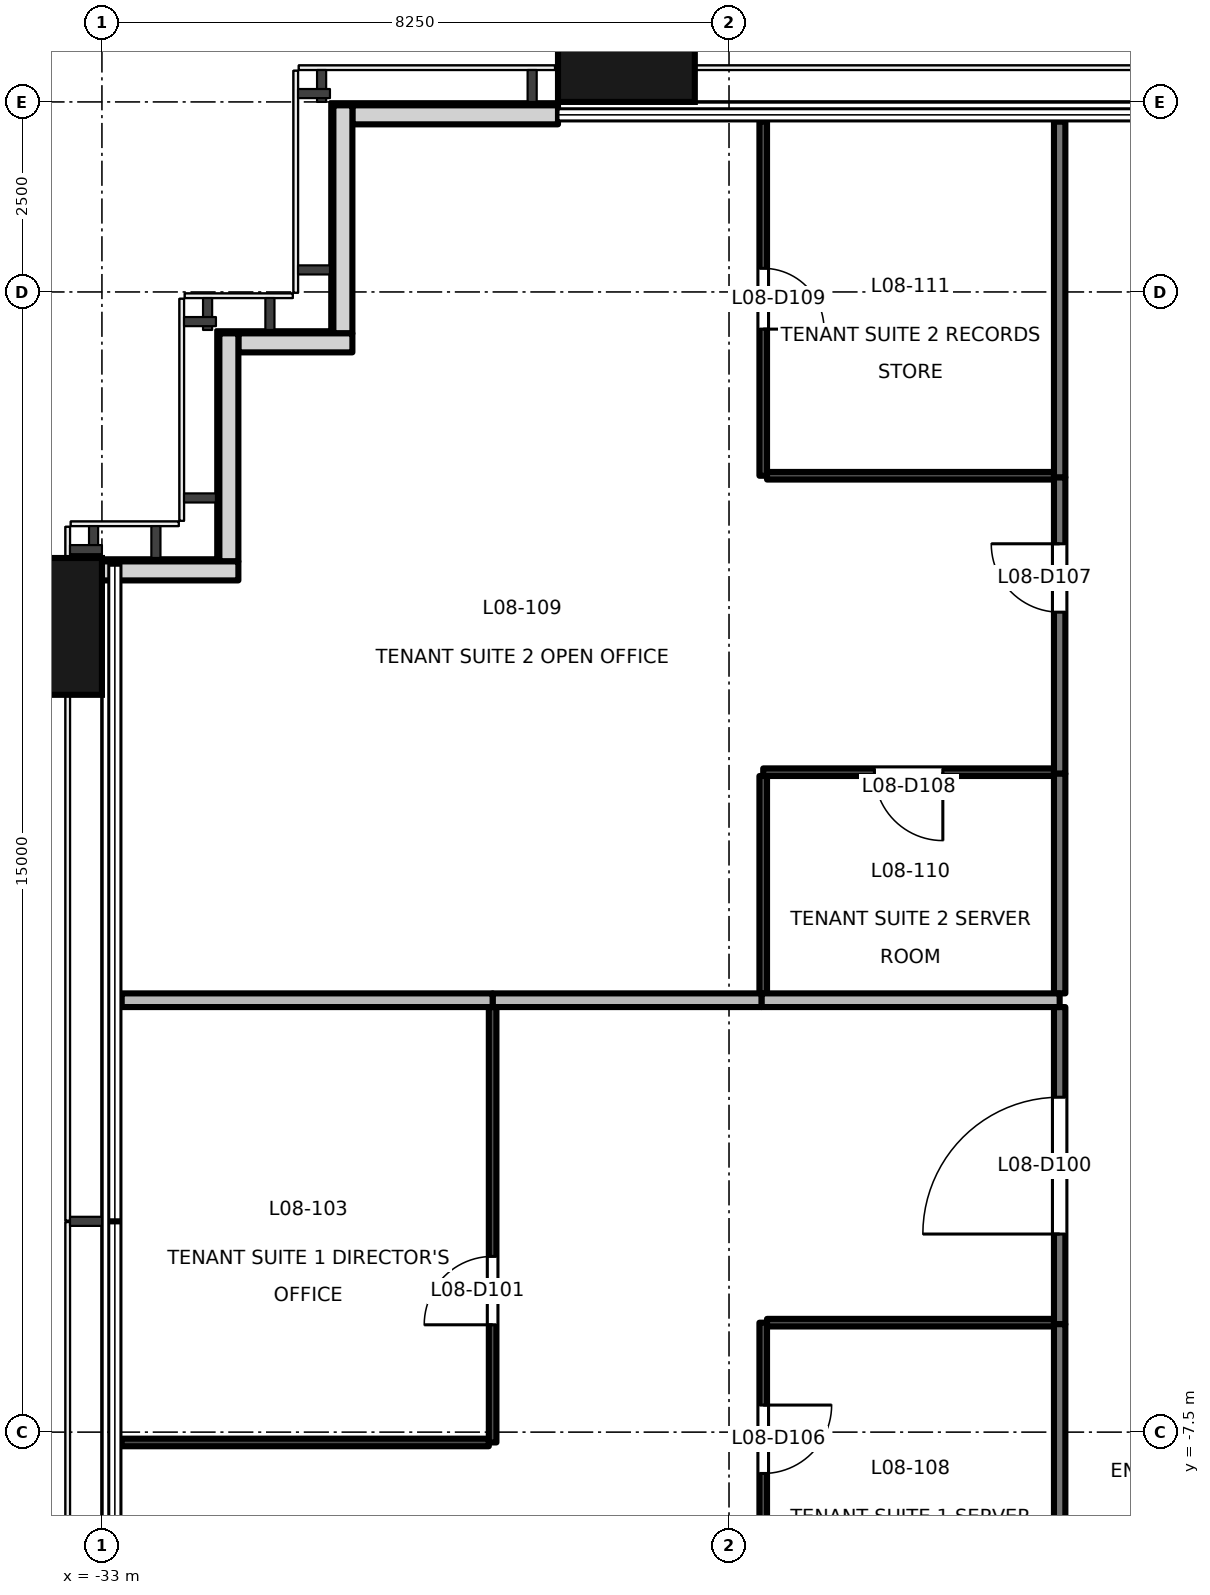
"""IFC4 building model, lengths in metres.
Left out: names, types, materials, properties, quantities, classifications, styles, units other than length and angle.
Written with IfcOpenShell. Run it as: python <this file> out.ifc"""

import sys

from ifc_helpers import new_model, si_unit, direction, frame, frame_2d, origin, origin_2d, place, context, subcontext, project, spatial, rectangle, extrude, element, fill, save


model = new_model("IFC4")
c1 = context("Model", 3, precision=1e-05, world=origin(), true_north=direction((0.0, 1.0)))
c2 = subcontext(c1, "Body", "Model", "MODEL_VIEW")
j1 = project(units=[si_unit("LENGTHUNIT", "METRE"), si_unit("PLANEANGLEUNIT", "RADIAN")], contexts=[c1])
p1 = place(None, origin())
s1 = spatial("IfcSite", under=j1, at=p1, CompositionType="ELEMENT")
p2 = place(p1, origin())
s2 = spatial("IfcBuilding", under=s1, at=p2, CompositionType="ELEMENT")
p3 = place(p2, frame((0.0, 0.0, 40.6)))
s3 = spatial("IfcBuildingStorey", under=s2, at=p3, CompositionType="ELEMENT", Elevation=40.6)
for number, where, z_axis, x_axis in (
    (1, (-33.9, 3.1, -0.2), (0.0, 0.0, 1.0), (0.0, 1.0, 0.0)),
    (2, (-26.1, 10.9, -0.2), (0.0, 0.0, 1.0), (1.0, 0.0, 0.0)),
):
    element("IfcColumn", number, at=place(p3, frame(where, z_axis=z_axis, x_axis=x_axis)), inside=s3, PredefinedType="COLUMN", context=c2, shape_type="SweptSolid", body=[
        extrude(rectangle(XDim=1.8, YDim=1.8, at=origin_2d()), origin(), (0.0, 0.0, 1.0), 4.1),
    ])
p4 = place(p3, frame((-27.0, 9.83, 0.0), z_axis=(0.0, 0.0, 1.0), x_axis=(-1.0, 0.0, 0.0)))
e3 = element("IfcWall", 3, at=p4, inside=s3, PredefinedType="SOLIDWALL", context=c2, shape_type="SweptSolid", body=[
    extrude(rectangle(XDim=2.705, YDim=0.25, at=frame_2d((1.353, 0.0))), origin(), (0.0, 0.0, 1.0), 3.9),
])
p5 = place(p3, frame((-29.83, 9.955, 0.0), z_axis=(0.0, 0.0, 1.0), x_axis=(0.0, -1.0, 0.0)))
e4 = element("IfcWall", 4, at=p5, inside=s3, PredefinedType="SOLIDWALL", context=c2, shape_type="SweptSolid", body=[
    extrude(rectangle(XDim=3.0, YDim=0.25, at=frame_2d((1.5, 0.0))), origin(), (0.0, 0.0, 1.0), 3.9),
])
p6 = place(p3, frame((-29.705, 6.83, 0.0), z_axis=(0.0, 0.0, 1.0), x_axis=(-1.0, 0.0, 0.0)))
e5 = element("IfcWall", 5, at=p6, inside=s3, PredefinedType="SOLIDWALL", context=c2, shape_type="SweptSolid", body=[
    extrude(rectangle(XDim=1.5, YDim=0.25, at=frame_2d((0.75, 0.0))), origin(), (0.0, 0.0, 1.0), 3.9),
])
p7 = place(p3, frame((-31.33, 6.955, 0.0), z_axis=(0.0, 0.0, 1.0), x_axis=(0.0, -1.0, 0.0)))
e6 = element("IfcWall", 6, at=p7, inside=s3, PredefinedType="SOLIDWALL", context=c2, shape_type="SweptSolid", body=[
    extrude(rectangle(XDim=3.0, YDim=0.25, at=frame_2d((1.5, 0.0))), origin(), (0.0, 0.0, 1.0), 3.9),
])
p8 = place(p3, frame((-31.205, 3.83, 0.0), z_axis=(0.0, 0.0, 1.0), x_axis=(-1.0, 0.0, 0.0)))
e7 = element("IfcWall", 7, at=p8, inside=s3, PredefinedType="SOLIDWALL", context=c2, shape_type="SweptSolid", body=[
    extrude(rectangle(XDim=1.8, YDim=0.25, at=frame_2d((0.9, 0.0))), origin(), (0.0, 0.0, 1.0), 3.9),
])
p9 = place(p3, frame((-20.4, -6.08, 0.0), z_axis=(0.0, 0.0, 1.0), x_axis=(0.0, 1.0, 0.0)))
e8 = element("IfcWall", 8, at=p9, inside=s3, PredefinedType="PARTITIONING", context=c2, shape_type="SweptSolid", body=[
    extrude(rectangle(XDim=4.172, YDim=0.15, at=frame_2d((2.086, 0.0))), origin(), (0.0, 0.0, 1.0), 3.3),
])
p10 = place(p9, frame((1.186, 0.0, 0.0)))
e9 = element("IfcOpeningElement", 9, at=p10, cuts=e8, PredefinedType="OPENING", context=c2, shape_type="SweptSolid", body=[
    extrude(rectangle(XDim=1.8, YDim=2.1, at=frame_2d((0.9, 1.05))), frame((0.0, 0.085, 0.0), z_axis=(0.0, -1.0, 0.0), x_axis=(1.0, 0.0, 0.0)), (0.0, 0.0, 1.0), 0.171),
])
p11 = place(p3, frame((-20.4, -10.28, 0.0), z_axis=(0.0, 0.0, 1.0), x_axis=(0.0, 1.0, 0.0)))
e10 = element("IfcWall", 10, at=p11, inside=s3, PredefinedType="PARTITIONING", context=c2, shape_type="SweptSolid", body=[
    extrude(rectangle(XDim=4.2, YDim=0.15, at=frame_2d((2.1, 0.0))), origin(), (0.0, 0.0, 1.0), 3.3),
])
p12 = place(p3, frame((-20.4, 1.162, 0.0), z_axis=(0.0, 0.0, 1.0), x_axis=(0.0, 1.0, 0.0)))
e11 = element("IfcWall", 11, at=p12, inside=s3, PredefinedType="PARTITIONING", context=c2, shape_type="SweptSolid", body=[
    extrude(rectangle(XDim=3.9, YDim=0.15, at=frame_2d((1.95, 0.0))), origin(), (0.0, 0.0, 1.0), 3.9),
])
p13 = place(p12, frame((2.125, 0.0, 0.0)))
e12 = element("IfcOpeningElement", 12, at=p13, cuts=e11, PredefinedType="OPENING", context=c2, shape_type="SweptSolid", body=[
    extrude(rectangle(XDim=0.9, YDim=2.1, at=frame_2d((0.45, 1.05))), frame((0.0, 0.085, 0.0), z_axis=(0.0, -1.0, 0.0), x_axis=(1.0, 0.0, 0.0)), (0.0, 0.0, 1.0), 0.171),
])
p14 = place(p3, frame((-20.4, -1.728, 0.0), z_axis=(0.0, 0.0, 1.0), x_axis=(0.0, 1.0, 0.0)))
e13 = element("IfcWall", 13, at=p14, inside=s3, PredefinedType="PARTITIONING", context=c2, shape_type="SweptSolid", body=[
    extrude(rectangle(XDim=2.89, YDim=0.15, at=frame_2d((1.445, 0.0))), origin(), (0.0, 0.0, 1.0), 3.3),
])
p15 = place(p3, frame((-20.4, 5.062, 0.0), z_axis=(0.0, 0.0, 1.0), x_axis=(0.0, 1.0, 0.0)))
e14 = element("IfcWall", 14, at=p15, inside=s3, PredefinedType="PARTITIONING", context=c2, shape_type="SweptSolid", body=[
    extrude(rectangle(XDim=4.678, YDim=0.15, at=frame_2d((2.339, 0.0))), origin(), (0.0, 0.0, 1.0), 3.9),
])
p16 = place(p3, frame((-32.74, -7.636, 0.0), z_axis=(0.0, 0.0, 1.0), x_axis=(1.0, 0.0, 0.0)))
e15 = element("IfcWall", 15, at=p16, inside=s3, PredefinedType="PARTITIONING", context=c2, shape_type="SweptSolid", body=[
    extrude(rectangle(XDim=4.83, YDim=0.1, at=frame_2d((2.415, 0.0))), origin(), (0.0, 0.0, 1.0), 3.9),
])
p17 = place(p3, frame((-27.86, -7.636, 0.0), z_axis=(0.0, 0.0, 1.0), x_axis=(0.0, 1.0, 0.0)))
e16 = element("IfcWall", 16, at=p17, inside=s3, PredefinedType="PARTITIONING", context=c2, shape_type="SweptSolid", body=[
    extrude(rectangle(XDim=5.728, YDim=0.1, at=frame_2d((2.864, 0.0))), origin(), (0.0, 0.0, 1.0), 3.3),
])
p18 = place(p17, frame((1.548, 0.0, 0.0)))
e17 = element("IfcOpeningElement", 17, at=p18, cuts=e16, PredefinedType="OPENING", context=c2, shape_type="SweptSolid", body=[
    extrude(rectangle(XDim=0.9, YDim=2.1, at=frame_2d((0.45, 1.05))), frame((0.0, 0.061, 0.0), z_axis=(0.0, -1.0, 0.0), x_axis=(1.0, 0.0, 0.0)), (0.0, 0.0, 1.0), 0.121),
])
p19 = place(p3, frame((-24.3, -6.06, 0.0), z_axis=(0.0, 0.0, 1.0), x_axis=(0.0, -1.0, 0.0)))
e18 = element("IfcWall", 18, at=p19, inside=s3, PredefinedType="PARTITIONING", context=c2, shape_type="SweptSolid", body=[
    extrude(rectangle(XDim=4.18, YDim=0.1, at=frame_2d((2.09, 0.0))), origin(), (0.0, 0.0, 1.0), 3.3),
])
p20 = place(p19, frame((1.084, 0.0, 0.0)))
e19 = element("IfcOpeningElement", 19, at=p20, cuts=e18, PredefinedType="OPENING", context=c2, shape_type="SweptSolid", body=[
    extrude(rectangle(XDim=0.9, YDim=2.1, at=frame_2d((0.45, 1.05))), frame((0.0, 0.061, 0.0), z_axis=(0.0, -1.0, 0.0), x_axis=(1.0, 0.0, 0.0)), (0.0, 0.0, 1.0), 0.121),
])
p21 = place(p3, frame((-20.475, -6.06, 0.0), z_axis=(0.0, 0.0, 1.0), x_axis=(-1.0, 0.0, 0.0)))
e20 = element("IfcWall", 20, at=p21, inside=s3, PredefinedType="PARTITIONING", context=c2, shape_type="SweptSolid", body=[
    extrude(rectangle(XDim=3.775, YDim=0.1, at=frame_2d((1.887, 0.0))), origin(), (0.0, 0.0, 1.0), 3.9),
])
p22 = place(p3, frame((-27.86, -1.818, 0.0), z_axis=(0.0, 0.0, 1.0), x_axis=(1.0, 0.0, 0.0)))
e21 = element("IfcWall", 21, at=p22, inside=s3, PredefinedType="PARTITIONING", context=c2, shape_type="SweptSolid", body=[
    extrude(rectangle(XDim=3.54, YDim=0.18, at=frame_2d((1.77, 0.0))), origin(), (0.0, 0.0, 1.0), 3.9),
])
p23 = place(p3, frame((-24.32, -1.818, 0.0), z_axis=(0.0, 0.0, 1.0), x_axis=(1.0, 0.0, 0.0)))
e22 = element("IfcWall", 22, at=p23, inside=s3, PredefinedType="PARTITIONING", context=c2, shape_type="SweptSolid", body=[
    extrude(rectangle(XDim=3.92, YDim=0.18, at=frame_2d((1.96, 0.0))), origin(), (0.0, 0.0, 1.0), 3.9),
])
p24 = place(p3, frame((-32.74, -1.818, 0.0), z_axis=(0.0, 0.0, 1.0), x_axis=(1.0, 0.0, 0.0)))
e23 = element("IfcWall", 23, at=p24, inside=s3, PredefinedType="PARTITIONING", context=c2, shape_type="SweptSolid", body=[
    extrude(rectangle(XDim=4.88, YDim=0.18, at=frame_2d((2.44, 0.0))), origin(), (0.0, 0.0, 1.0), 3.9),
])
p25 = place(p3, frame((-24.3, 1.132, 0.0), z_axis=(0.0, 0.0, 1.0), x_axis=(0.0, -1.0, 0.0)))
e24 = element("IfcWall", 24, at=p25, inside=s3, PredefinedType="PARTITIONING", context=c2, shape_type="SweptSolid", body=[
    extrude(rectangle(XDim=2.86, YDim=0.1, at=frame_2d((1.43, 0.0))), origin(), (0.0, 0.0, 1.0), 3.3),
])
p26 = place(p3, frame((-20.475, 1.182, 0.0), z_axis=(0.0, 0.0, 1.0), x_axis=(-1.0, 0.0, 0.0)))
e25 = element("IfcWall", 25, at=p26, inside=s3, PredefinedType="PARTITIONING", context=c2, shape_type="SweptSolid", body=[
    extrude(rectangle(XDim=3.825, YDim=0.1, at=frame_2d((1.913, 0.0))), origin(), (0.0, 0.0, 1.0), 3.9),
])
p27 = place(p26, frame((1.462, 0.0, 0.0)))
e26 = element("IfcOpeningElement", 26, at=p27, cuts=e25, PredefinedType="OPENING", context=c2, shape_type="SweptSolid", body=[
    extrude(rectangle(XDim=0.9, YDim=2.1, at=frame_2d((0.45, 1.05))), frame((0.0, 0.061, 0.0), z_axis=(0.0, -1.0, 0.0), x_axis=(1.0, 0.0, 0.0)), (0.0, 0.0, 1.0), 0.121),
])
p28 = place(p3, frame((-24.3, 9.74, 0.0), z_axis=(0.0, 0.0, 1.0), x_axis=(0.0, -1.0, 0.0)))
e27 = element("IfcWall", 27, at=p28, inside=s3, PredefinedType="PARTITIONING", context=c2, shape_type="SweptSolid", body=[
    extrude(rectangle(XDim=4.658, YDim=0.1, at=frame_2d((2.329, 0.0))), origin(), (0.0, 0.0, 1.0), 3.9),
])
p29 = place(p28, frame((1.929, 0.0, 0.0)))
e28 = element("IfcOpeningElement", 28, at=p29, cuts=e27, PredefinedType="OPENING", context=c2, shape_type="SweptSolid", body=[
    extrude(rectangle(XDim=0.8, YDim=2.1, at=frame_2d((0.4, 1.05))), frame((0.0, 0.061, 0.0), z_axis=(0.0, -1.0, 0.0), x_axis=(1.0, 0.0, 0.0)), (0.0, 0.0, 1.0), 0.121),
])
p30 = place(p3, frame((-24.25, 5.082, 0.0), z_axis=(0.0, 0.0, 1.0), x_axis=(1.0, 0.0, 0.0)))
e29 = element("IfcWall", 29, at=p30, inside=s3, PredefinedType="PARTITIONING", context=c2, shape_type="SweptSolid", body=[
    extrude(rectangle(XDim=3.775, YDim=0.1, at=frame_2d((1.887, 0.0))), origin(), (0.0, 0.0, 1.0), 3.9),
])
p31 = place(p10, origin())
e30 = element("IfcDoor", 30, at=p31, inside=s3, OperationType="DOUBLE_DOOR_SINGLE_SWING", PredefinedType="DOOR", context=c2, shape_type="SweptSolid", body=[
    extrude(rectangle(XDim=1.8, YDim=2.1, at=frame_2d((0.9, 1.05))), frame((0.0, 0.025, 0.0), z_axis=(0.0, -1.0, 0.0), x_axis=(1.0, 0.0, 0.0)), (0.0, 0.0, 1.0), 0.05),
])
fill(e9, e30)
p32 = place(p18, origin())
e31 = element("IfcDoor", 31, at=p32, inside=s3, OperationType="SINGLE_SWING_LEFT", PredefinedType="DOOR", context=c2, shape_type="SweptSolid", body=[
    extrude(rectangle(XDim=0.9, YDim=2.1, at=frame_2d((0.45, 1.05))), frame((0.0, 0.025, 0.0), z_axis=(0.0, -1.0, 0.0), x_axis=(1.0, 0.0, 0.0)), (0.0, 0.0, 1.0), 0.05),
])
fill(e17, e31)
p33 = place(p20, origin())
e32 = element("IfcDoor", 32, at=p33, inside=s3, OperationType="SINGLE_SWING_LEFT", PredefinedType="DOOR", context=c2, shape_type="SweptSolid", body=[
    extrude(rectangle(XDim=0.9, YDim=2.1, at=frame_2d((0.45, 1.05))), frame((0.0, 0.025, 0.0), z_axis=(0.0, -1.0, 0.0), x_axis=(1.0, 0.0, 0.0)), (0.0, 0.0, 1.0), 0.05),
])
fill(e19, e32)
p34 = place(p13, origin())
e33 = element("IfcDoor", 33, at=p34, inside=s3, OperationType="SINGLE_SWING_RIGHT", PredefinedType="DOOR", context=c2, shape_type="SweptSolid", body=[
    extrude(rectangle(XDim=0.9, YDim=2.1, at=frame_2d((0.45, 1.05))), frame((0.0, 0.025, 0.0), z_axis=(0.0, -1.0, 0.0), x_axis=(1.0, 0.0, 0.0)), (0.0, 0.0, 1.0), 0.05),
])
fill(e12, e33)
p35 = place(p27, origin())
e34 = element("IfcDoor", 34, at=p35, inside=s3, OperationType="SINGLE_SWING_LEFT", PredefinedType="DOOR", context=c2, shape_type="SweptSolid", body=[
    extrude(rectangle(XDim=0.9, YDim=2.1, at=frame_2d((0.45, 1.05))), frame((0.0, 0.025, 0.0), z_axis=(0.0, -1.0, 0.0), x_axis=(1.0, 0.0, 0.0)), (0.0, 0.0, 1.0), 0.05),
])
fill(e26, e34)
p36 = place(p29, origin())
e35 = element("IfcDoor", 35, at=p36, inside=s3, OperationType="SINGLE_SWING_RIGHT", PredefinedType="DOOR", context=c2, shape_type="SweptSolid", body=[
    extrude(rectangle(XDim=0.8, YDim=2.1, at=frame_2d((0.4, 1.05))), frame((0.0, 0.025, 0.0), z_axis=(0.0, -1.0, 0.0), x_axis=(1.0, 0.0, 0.0)), (0.0, 0.0, 1.0), 0.05),
])
fill(e28, e35)
save(model, sys.argv[1])
